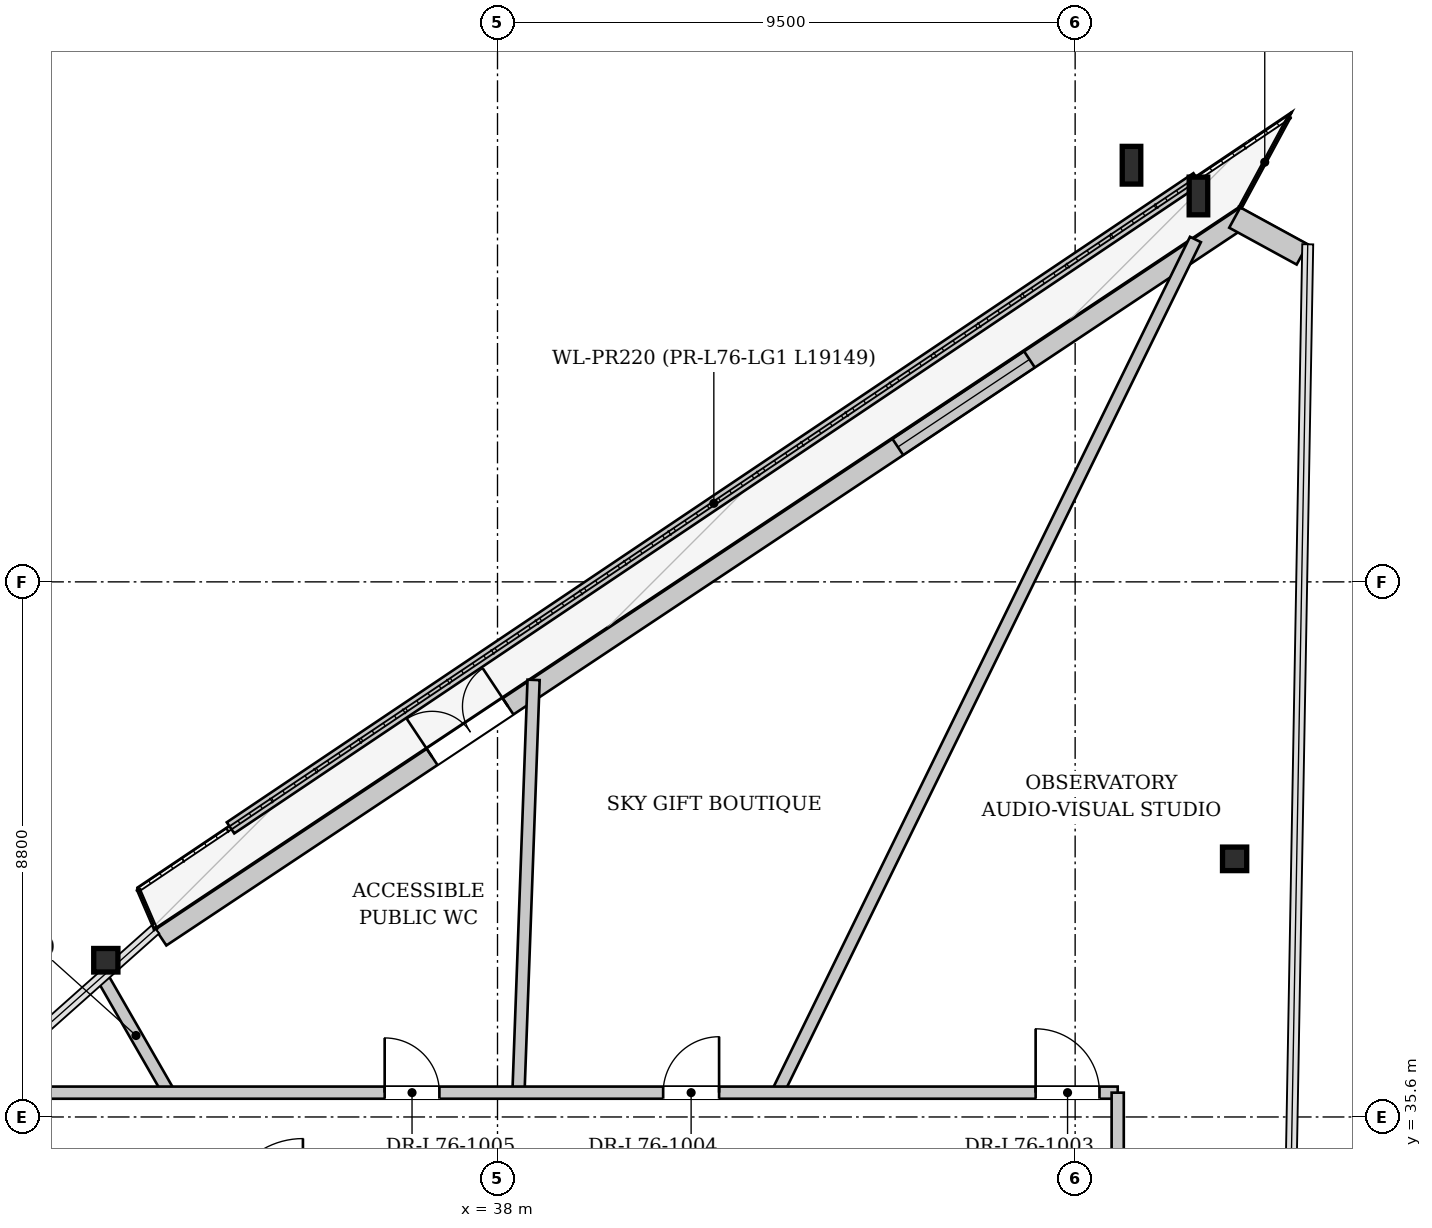
"""IFC4 building model, lengths in metres.
Left out: names, types, materials, properties, quantities, classifications, styles, units other than length and angle.
Written with IfcOpenShell. Run it as: python <this file> out.ifc"""

import sys

from ifc_helpers import new_model, si_unit, direction, frame, frame_2d, origin, origin_2d, place, context, subcontext, project, spatial, rectangle, i_section, extrude, source, transform, mapped, element, fill, save


model = new_model("IFC4")
c1 = context("Model", 3, precision=1e-05, world=origin(), true_north=direction((0.0, 1.0)))
c2 = subcontext(c1, "Body", "Model", "MODEL_VIEW")
j1 = project(units=[si_unit("LENGTHUNIT", "METRE"), si_unit("PLANEANGLEUNIT", "RADIAN")], contexts=[c1])
p1 = place(None, origin())
s1 = spatial("IfcSite", under=j1, at=p1, CompositionType="ELEMENT")
p2 = place(p1, origin())
s2 = spatial("IfcBuilding", under=s1, at=p2, CompositionType="ELEMENT")
p3 = place(p2, frame((0.0, 0.0, 286.1)))
s3 = spatial("IfcBuildingStorey", under=s2, at=p3, CompositionType="ELEMENT", Elevation=286.1)
m1 = source(origin(), c2, "Body", "SweptSolid", [
    extrude(i_section(OverallWidth=0.305, OverallDepth=0.62, WebThickness=0.021, FlangeThickness=0.04, at=origin_2d()), origin(), (0.0, 0.0, 1.0), 5.705),
])
p4 = place(p3, frame((51.325, 49.952, 0.0), z_axis=(-0.630132763972, 0.27858501144, 0.724791757107), x_axis=(-0.404351160465, -0.914603815338, 0.0)))
e1 = element("IfcColumn", 1, at=p4, inside=s3, PredefinedType="COLUMN", context=c2, shape_type="MappedRepresentation", body=[
    mapped(m1, transform((0.0, 0.0, 0.0), x_axis=(1.0, 0.0, 0.0), y_axis=(0.0, 1.0, 0.0), z_axis=(0.0, 0.0, 1.0), scale=1.0)),
])
m2 = source(origin(), c2, "Body", "SweptSolid", [
    extrude(i_section(OverallWidth=0.305, OverallDepth=0.62, WebThickness=0.021, FlangeThickness=0.04, at=origin_2d()), origin(), (0.0, 0.0, 1.0), 5.642),
])
p5 = place(p3, frame((50.216, 50.558, 0.0), z_axis=(-0.634270773304, 0.246127176869, 0.732886075007), x_axis=(-0.361764793743, -0.93226939991, 0.0)))
e2 = element("IfcColumn", 2, at=p5, inside=s3, PredefinedType="COLUMN", context=c2, shape_type="MappedRepresentation", body=[
    mapped(m2, transform((0.0, 0.0, 0.0), x_axis=(1.0, 0.0, 0.0), y_axis=(0.0, 1.0, 0.0), z_axis=(0.0, 0.0, 1.0), scale=1.0)),
])
m3 = source(origin(), c2, "Body", "SweptSolid", [
    extrude(i_section(OverallWidth=0.398, OverallDepth=0.387, WebThickness=0.019, FlangeThickness=0.029, at=origin_2d()), origin(), (0.0, 0.0, 1.0), 4.562),
])
p6 = place(p3, frame((32.376, 38.687, 0.0), z_axis=(-0.358650833306, -0.223313925304, 0.90636663141), x_axis=(0.528563619327, -0.848893692004, 0.0)))
e3 = element("IfcColumn", 3, at=p6, inside=s3, PredefinedType="COLUMN", context=c2, shape_type="MappedRepresentation", body=[
    mapped(m3, transform((0.0, 0.0, 0.0), x_axis=(1.0, 0.0, 0.0), y_axis=(0.0, 1.0, 0.0), z_axis=(0.0, 0.0, 1.0), scale=1.0)),
])
m4 = source(origin(), c2, "Body", "SweptSolid", [
    extrude(i_section(OverallWidth=0.398, OverallDepth=0.387, WebThickness=0.019, FlangeThickness=0.029, at=origin_2d()), origin(), (0.0, 0.0, 1.0), 4.906),
])
p7 = place(p3, frame((51.129, 38.991, 0.0), z_axis=(-0.410278483219, 0.348119600936, 0.842902313232), x_axis=(-0.64698233698, -0.762504987286, 0.0)))
e4 = element("IfcColumn", 4, at=p7, inside=s3, PredefinedType="COLUMN", context=c2, shape_type="MappedRepresentation", body=[
    mapped(m4, transform((0.0, 0.0, 0.0), x_axis=(1.0, 0.0, 0.0), y_axis=(0.0, 1.0, 0.0), z_axis=(0.0, 0.0, 1.0), scale=1.0)),
])
p8 = place(p3, frame((32.465, 38.554, 0.0), z_axis=(0.0, 0.0, 1.0), x_axis=(0.832540755873, 0.553963798285, 0.0)))
e5 = element("IfcWall", 5, at=p8, inside=s3, PredefinedType="SOLIDWALL", context=c2, shape_type="SweptSolid", body=[
    extrude(rectangle(XDim=21.428, YDim=0.32, at=frame_2d((10.714, 0.0))), origin(), (0.0, 0.0, 1.0), 3.662),
])
p9 = place(p8, frame((5.357, 0.0, 0.0)))
e6 = element("IfcOpeningElement", 6, at=p9, cuts=e5, PredefinedType="OPENING", context=c2, shape_type="SweptSolid", body=[
    extrude(rectangle(XDim=1.5, YDim=2.3, at=frame_2d((0.75, 1.15))), frame((0.0, 0.17, 0.0), z_axis=(0.0, -1.0, 0.0), x_axis=(1.0, 0.0, 0.0)), (0.0, 0.0, 1.0), 0.34),
])
p10 = place(p8, frame((14.557, 0.0, 0.65)))
e7 = element("IfcOpeningElement", 7, at=p10, cuts=e5, PredefinedType="OPENING", context=c2, shape_type="SweptSolid", body=[
    extrude(rectangle(XDim=2.6, YDim=2.35, at=frame_2d((1.3, 1.175))), frame((0.0, 0.17, 0.0), z_axis=(0.0, -1.0, 0.0), x_axis=(1.0, 0.0, 0.0)), (0.0, 0.0, 1.0), 0.34),
])
p11 = place(p3, frame((50.125, 50.391, 0.0), z_axis=(0.0, 0.0, 1.0), x_axis=(0.877570550329, -0.479447524965, 0.0)))
e8 = element("IfcWall", 8, at=p11, inside=s3, PredefinedType="SOLIDWALL", context=c2, shape_type="SweptSolid", body=[
    extrude(rectangle(XDim=1.264, YDim=0.38, at=frame_2d((0.632, 0.0))), origin(), (0.0, 0.0, 1.0), 3.662),
])
p12 = place(p3, frame((49.507, 51.03, 0.0), z_axis=(0.0, 0.0, 1.0), x_axis=(-0.830196011269, -0.557471598266, 0.0)))
e9 = element("IfcWall", 9, at=p12, inside=s3, PredefinedType="PARAPET", context=c2, shape_type="SweptSolid", body=[
    extrude(rectangle(XDim=19.149, YDim=0.22, at=frame_2d((9.574, 0.0))), origin(), (0.0, 0.0, 1.0), 0.3),
])
p13 = place(p3, frame((32.595, 36.0, 0.0), z_axis=(0.0, 0.0, 1.0), x_axis=(-0.498441501914, 0.866923335232, 0.0)))
e10 = element("IfcWall", 10, at=p13, inside=s3, PredefinedType="PARTITIONING", context=c2, shape_type="SweptSolid", body=[
    extrude(rectangle(XDim=2.168, YDim=0.2, at=frame_2d((1.084, 0.0))), origin(), (0.0, 0.0, 1.0), 4.12),
])
p14 = place(p3, frame((42.605, 36.0, 0.0), z_axis=(0.0, 0.0, 1.0), x_axis=(0.439942035574, 0.898026171854, 0.0)))
e11 = element("IfcWall", 11, at=p14, inside=s3, PredefinedType="PARTITIONING", context=c2, shape_type="SweptSolid", body=[
    extrude(rectangle(XDim=15.624, YDim=0.2, at=frame_2d((7.812, 0.0))), origin(), (0.0, 0.0, 1.0), 4.12),
])
p15 = place(p3, frame((38.345, 36.0, 0.0), z_axis=(0.0, 0.0, 1.0), x_axis=(0.036626129912, 0.999329038209, 0.0)))
e12 = element("IfcWall", 12, at=p15, inside=s3, PredefinedType="PARTITIONING", context=c2, shape_type="SweptSolid", body=[
    extrude(rectangle(XDim=6.792, YDim=0.2, at=frame_2d((3.396, 0.0))), origin(), (0.0, 0.0, 1.0), 4.12),
])
p16 = place(p3, frame((29.402, 36.0, 0.0), z_axis=(0.0, 0.0, 1.0), x_axis=(1.0, 0.0, 0.0)))
e13 = element("IfcWall", 13, at=p16, inside=s3, PredefinedType="PARTITIONING", context=c2, shape_type="SweptSolid", body=[
    extrude(rectangle(XDim=18.798, YDim=0.2, at=frame_2d((9.399, 0.0))), origin(), (0.0, 0.0, 1.0), 4.12),
])
p17 = place(p16, frame((17.448, 0.0, 0.0)))
e14 = element("IfcOpeningElement", 14, at=p17, cuts=e13, PredefinedType="OPENING", context=c2, shape_type="SweptSolid", body=[
    extrude(rectangle(XDim=1.05, YDim=2.2, at=frame_2d((0.525, 1.1))), frame((0.0, 0.11, 0.0), z_axis=(0.0, -1.0, 0.0), x_axis=(1.0, 0.0, 0.0)), (0.0, 0.0, 1.0), 0.22),
])
p18 = place(p16, frame((11.322, 0.0, 0.0)))
e15 = element("IfcOpeningElement", 15, at=p18, cuts=e13, PredefinedType="OPENING", context=c2, shape_type="SweptSolid", body=[
    extrude(rectangle(XDim=0.92, YDim=2.1, at=frame_2d((0.46, 1.05))), frame((0.0, 0.11, 0.0), z_axis=(0.0, -1.0, 0.0), x_axis=(1.0, 0.0, 0.0)), (0.0, 0.0, 1.0), 0.22),
])
p19 = place(p16, frame((6.742, 0.0, 0.0)))
e16 = element("IfcOpeningElement", 16, at=p19, cuts=e13, PredefinedType="OPENING", context=c2, shape_type="SweptSolid", body=[
    extrude(rectangle(XDim=0.9, YDim=2.1, at=frame_2d((0.45, 1.05))), frame((0.0, 0.11, 0.0), z_axis=(0.0, -1.0, 0.0), x_axis=(1.0, 0.0, 0.0)), (0.0, 0.0, 1.0), 0.22),
])
p20 = place(p3, frame((48.2, 23.0, 0.0), z_axis=(0.0, 0.0, 1.0), x_axis=(0.0, 1.0, 0.0)))
e17 = element("IfcWall", 17, at=p20, inside=s3, PredefinedType="PARTITIONING", context=c2, shape_type="SweptSolid", body=[
    extrude(rectangle(XDim=13.0, YDim=0.2, at=frame_2d((6.5, 0.0))), origin(), (0.0, 0.0, 1.0), 3.745),
])
m5 = source(origin(), c2, "Body", "SweptSolid", [
    extrude(rectangle(XDim=1.5, YDim=2.3, at=frame_2d((0.75, 1.15))), frame((0.0, 0.025, 0.0), z_axis=(0.0, -1.0, 0.0), x_axis=(1.0, 0.0, 0.0)), (0.0, 0.0, 1.0), 0.05),
])
p21 = place(p9, origin())
e18 = element("IfcDoor", 18, at=p21, inside=s3, OperationType="DOUBLE_DOOR_SINGLE_SWING", PredefinedType="DOOR", context=c2, shape_type="MappedRepresentation", body=[
    mapped(m5, transform((0.0, 0.0, 0.0), x_axis=(1.0, 0.0, 0.0), y_axis=(0.0, 1.0, 0.0), z_axis=(0.0, 0.0, 1.0), scale=1.0)),
])
fill(e6, e18)
m6 = source(origin(), c2, "Body", "SweptSolid", [
    extrude(rectangle(XDim=2.6, YDim=2.35, at=frame_2d((1.3, 1.175))), frame((0.0, 0.03, 0.0), z_axis=(0.0, -1.0, 0.0), x_axis=(1.0, 0.0, 0.0)), (0.0, 0.0, 1.0), 0.06),
])
p22 = place(p10, origin())
e19 = element("IfcWindow", 19, at=p22, inside=s3, PartitioningType="SINGLE_PANEL", PredefinedType="WINDOW", context=c2, shape_type="MappedRepresentation", body=[
    mapped(m6, transform((0.0, 0.0, 0.0), x_axis=(1.0, 0.0, 0.0), y_axis=(0.0, 1.0, 0.0), z_axis=(0.0, 0.0, 1.0), scale=1.0)),
])
fill(e7, e19)
m7 = source(origin(), c2, "Body", "SweptSolid", [
    extrude(rectangle(XDim=1.05, YDim=2.2, at=frame_2d((0.525, 1.1))), frame((0.0, 0.025, 0.0), z_axis=(0.0, -1.0, 0.0), x_axis=(1.0, 0.0, 0.0)), (0.0, 0.0, 1.0), 0.05),
])
p23 = place(p17, origin())
e20 = element("IfcDoor", 20, at=p23, inside=s3, OperationType="SINGLE_SWING_LEFT", PredefinedType="DOOR", context=c2, shape_type="MappedRepresentation", body=[
    mapped(m7, transform((0.0, 0.0, 0.0), x_axis=(1.0, 0.0, 0.0), y_axis=(0.0, 1.0, 0.0), z_axis=(0.0, 0.0, 1.0), scale=1.0)),
])
fill(e14, e20)
m8 = source(origin(), c2, "Body", "SweptSolid", [
    extrude(rectangle(XDim=0.92, YDim=2.1, at=frame_2d((0.46, 1.05))), frame((0.0, 0.025, 0.0), z_axis=(0.0, -1.0, 0.0), x_axis=(1.0, 0.0, 0.0)), (0.0, 0.0, 1.0), 0.05),
])
p24 = place(p18, origin())
e21 = element("IfcDoor", 21, at=p24, inside=s3, OperationType="SINGLE_SWING_RIGHT", PredefinedType="DOOR", context=c2, shape_type="MappedRepresentation", body=[
    mapped(m8, transform((0.0, 0.0, 0.0), x_axis=(1.0, 0.0, 0.0), y_axis=(0.0, 1.0, 0.0), z_axis=(0.0, 0.0, 1.0), scale=1.0)),
])
fill(e15, e21)
m9 = source(origin(), c2, "Body", "SweptSolid", [
    extrude(rectangle(XDim=0.9, YDim=2.1, at=frame_2d((0.45, 1.05))), frame((0.0, 0.025, 0.0), z_axis=(0.0, -1.0, 0.0), x_axis=(1.0, 0.0, 0.0)), (0.0, 0.0, 1.0), 0.05),
])
p25 = place(p19, origin())
e22 = element("IfcDoor", 22, at=p25, inside=s3, OperationType="SINGLE_SWING_LEFT", PredefinedType="DOOR", context=c2, shape_type="MappedRepresentation", body=[
    mapped(m9, transform((0.0, 0.0, 0.0), x_axis=(1.0, 0.0, 0.0), y_axis=(0.0, 1.0, 0.0), z_axis=(0.0, 0.0, 1.0), scale=1.0)),
])
fill(e16, e22)
save(model, sys.argv[1])
